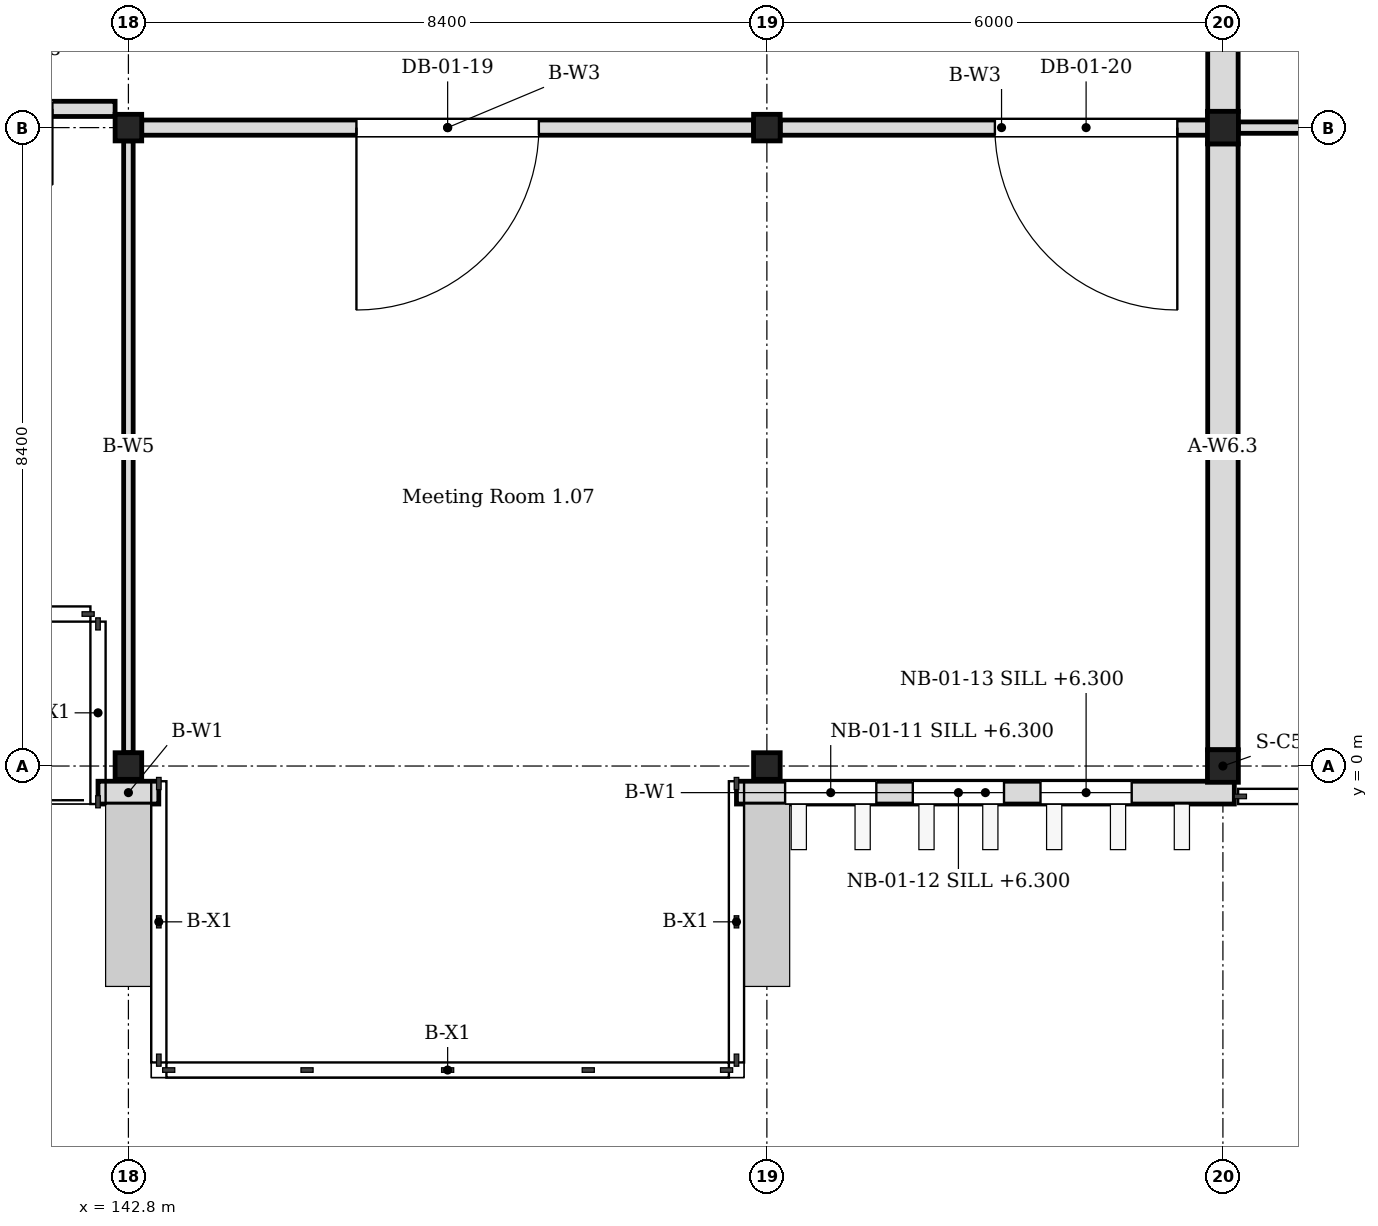
"""IFC4 building model, lengths in metres.
Left out: names, types, materials, properties, quantities, classifications, styles, units other than length and angle.
Written with IfcOpenShell. Run it as: python <this file> out.ifc"""

import sys

from ifc_helpers import new_model, si_unit, direction, frame, frame_2d, origin, origin_2d, place, context, subcontext, project, spatial, rectangle, i_section, extrude, element, fill, save


model = new_model("IFC4")
c1 = context("Model", 3, precision=1e-05, world=origin(), true_north=direction((0.0, 1.0)))
c2 = subcontext(c1, "Body", "Model", "MODEL_VIEW")
j1 = project(units=[si_unit("LENGTHUNIT", "METRE"), si_unit("PLANEANGLEUNIT", "RADIAN")], contexts=[c1])
p1 = place(None, origin())
s1 = spatial("IfcSite", under=j1, at=p1, CompositionType="ELEMENT")
p2 = place(p1, origin())
s2 = spatial("IfcBuilding", under=s1, at=p2, CompositionType="ELEMENT")
p3 = place(p2, frame((0.0, 0.0, 6.0)))
s3 = spatial("IfcBuildingStorey", under=s2, at=p3, CompositionType="ELEMENT", Elevation=6.0)
for number, where, z_axis, x_axis in (
    (1, (157.2, 0.0, 0.0), (0.0, 0.0, 1.0), (1.0, 0.0, 0.0)),
    (2, (157.2, 8.4, 0.0), (0.0, 0.0, 1.0), (1.0, 0.0, 0.0)),
):
    element("IfcColumn", number, at=place(p3, frame(where, z_axis=z_axis, x_axis=x_axis)), inside=s3, PredefinedType="COLUMN", context=c2, shape_type="SweptSolid", body=[
        extrude(i_section(OverallWidth=0.407, OverallDepth=0.428, WebThickness=0.02, FlangeThickness=0.035, FilletRadius=0.022, at=origin_2d()), origin(), (0.0, 0.0, 1.0), 4.2),
    ])
for number, where, z_axis, x_axis in (
    (3, (142.8, 0.0, 0.0), (0.0, 0.0, 1.0), (1.0, 0.0, 0.0)),
    (4, (142.8, 8.4, 0.0), (0.0, 0.0, 1.0), (1.0, 0.0, 0.0)),
    (5, (151.2, 0.0, 0.0), (0.0, 0.0, 1.0), (1.0, 0.0, 0.0)),
    (6, (151.2, 8.4, 0.0), (0.0, 0.0, 1.0), (1.0, 0.0, 0.0)),
):
    element("IfcColumn", number, at=place(p3, frame(where, z_axis=z_axis, x_axis=x_axis)), inside=s3, PredefinedType="COLUMN", context=c2, shape_type="SweptSolid", body=[
        extrude(i_section(OverallWidth=0.35, OverallDepth=0.35, WebThickness=0.012, FlangeThickness=0.019, FilletRadius=0.013, at=origin_2d()), origin(), (0.0, 0.0, 1.0), 4.2),
    ])
p4 = place(p3, frame((142.4, -0.35, 0.0), z_axis=(0.0, 0.0, 1.0), x_axis=(1.0, 0.0, 0.0)))
e7 = element("IfcWall", 7, at=p4, inside=s3, PredefinedType="SOLIDWALL", context=c2, shape_type="SweptSolid", body=[
    extrude(rectangle(XDim=0.8, YDim=0.3, at=frame_2d((0.4, 0.0))), origin(), (0.0, 0.0, 1.0), 4.05),
])
p5 = place(p3, frame((150.8, -0.35, 0.0), z_axis=(0.0, 0.0, 1.0), x_axis=(1.0, 0.0, 0.0)))
e8 = element("IfcWall", 8, at=p5, inside=s3, PredefinedType="SOLIDWALL", context=c2, shape_type="SweptSolid", body=[
    extrude(rectangle(XDim=6.55, YDim=0.3, at=frame_2d((3.275, 0.0))), origin(), (0.0, 0.0, 1.0), 4.05),
])
p6 = place(p5, frame((0.64, 0.0, 0.3)))
e9 = element("IfcOpeningElement", 9, at=p6, cuts=e8, PredefinedType="OPENING", context=c2, shape_type="SweptSolid", body=[
    extrude(rectangle(XDim=1.2, YDim=3.3, at=frame_2d((0.6, 1.65))), frame((0.0, 0.16, 0.0), z_axis=(0.0, -1.0, 0.0), x_axis=(1.0, 0.0, 0.0)), (0.0, 0.0, 1.0), 0.32),
])
p7 = place(p5, frame((2.32, 0.0, 0.3)))
e10 = element("IfcOpeningElement", 10, at=p7, cuts=e8, PredefinedType="OPENING", context=c2, shape_type="SweptSolid", body=[
    extrude(rectangle(XDim=1.2, YDim=3.3, at=frame_2d((0.6, 1.65))), frame((0.0, 0.16, 0.0), z_axis=(0.0, -1.0, 0.0), x_axis=(1.0, 0.0, 0.0)), (0.0, 0.0, 1.0), 0.32),
])
p8 = place(p5, frame((4.0, 0.0, 0.3)))
e11 = element("IfcOpeningElement", 11, at=p8, cuts=e8, PredefinedType="OPENING", context=c2, shape_type="SweptSolid", body=[
    extrude(rectangle(XDim=1.2, YDim=3.3, at=frame_2d((0.6, 1.65))), frame((0.0, 0.16, 0.0), z_axis=(0.0, -1.0, 0.0), x_axis=(1.0, 0.0, 0.0)), (0.0, 0.0, 1.0), 0.32),
])
p9 = place(p2, origin())
s4 = spatial("IfcBuildingStorey", under=s2, at=p9, CompositionType="ELEMENT", Elevation=0.0)
p10 = place(p9, frame((157.2, 0.214, 0.0), z_axis=(0.0, 0.0, 1.0), x_axis=(0.0, 1.0, 0.0)))
e12 = element("IfcWall", 12, at=p10, inside=s4, PredefinedType="SOLIDWALL", context=c2, shape_type="SweptSolid", body=[
    extrude(rectangle(XDim=7.972, YDim=0.4, at=frame_2d((3.986, 0.0))), origin(), (0.0, 0.0, 1.0), 9.45),
])
p11 = place(p9, frame((157.404, 8.4, 0.0), z_axis=(0.0, 0.0, 1.0), x_axis=(1.0, 0.0, 0.0)))
e13 = element("IfcWall", 13, at=p11, inside=s4, PredefinedType="PARTITIONING", context=c2, shape_type="SweptSolid", body=[
    extrude(rectangle(XDim=10.396, YDim=0.15, at=frame_2d((5.198, 0.0))), origin(), (0.0, 0.0, 1.0), 9.604),
])
p12 = place(p11, frame((2.997, 0.0, 0.0)))
e14 = element("IfcOpeningElement", 14, at=p12, cuts=e13, PredefinedType="OPENING", context=c2, shape_type="SweptSolid", body=[
    extrude(rectangle(XDim=1.2, YDim=2.1, at=frame_2d((0.6, 1.05))), frame((0.0, 0.085, 0.0), z_axis=(0.0, -1.0, 0.0), x_axis=(1.0, 0.0, 0.0)), (0.0, 0.0, 1.0), 0.17),
])
p13 = place(p3, frame((134.575, 8.646, 0.0), z_axis=(0.0, 0.0, 1.0), x_axis=(1.0, 0.0, 0.0)))
e15 = element("IfcWall", 15, at=p13, inside=s3, PredefinedType="PARTITIONING", context=c2, shape_type="SweptSolid", body=[
    extrude(rectangle(XDim=8.05, YDim=0.2, at=frame_2d((4.025, 0.0))), origin(), (0.0, 0.0, 1.0), 3.35),
])
p14 = place(p13, frame((6.225, 0.0, 0.0)))
e16 = element("IfcOpeningElement", 16, at=p14, cuts=e15, PredefinedType="OPENING", context=c2, shape_type="SweptSolid", body=[
    extrude(rectangle(XDim=1.0, YDim=2.1, at=frame_2d((0.5, 1.05))), frame((0.0, 0.11, 0.0), z_axis=(0.0, -1.0, 0.0), x_axis=(1.0, 0.0, 0.0)), (0.0, 0.0, 1.0), 0.22),
])
p15 = place(p3, frame((142.975, 8.4, 0.0), z_axis=(0.0, 0.0, 1.0), x_axis=(1.0, 0.0, 0.0)))
e17 = element("IfcWall", 17, at=p15, inside=s3, PredefinedType="PARTITIONING", context=c2, shape_type="SweptSolid", body=[
    extrude(rectangle(XDim=8.05, YDim=0.2, at=frame_2d((4.025, 0.0))), origin(), (0.0, 0.0, 1.0), 3.35),
])
p16 = place(p15, frame((2.825, 0.0, 0.0)))
e18 = element("IfcOpeningElement", 18, at=p16, cuts=e17, PredefinedType="OPENING", context=c2, shape_type="SweptSolid", body=[
    extrude(rectangle(XDim=2.4, YDim=2.2, at=frame_2d((1.2, 1.1))), frame((0.0, 0.11, 0.0), z_axis=(0.0, -1.0, 0.0), x_axis=(1.0, 0.0, 0.0)), (0.0, 0.0, 1.0), 0.22),
])
p17 = place(p3, frame((151.375, 8.4, 0.0), z_axis=(0.0, 0.0, 1.0), x_axis=(1.0, 0.0, 0.0)))
e19 = element("IfcWall", 19, at=p17, inside=s3, PredefinedType="PARTITIONING", context=c2, shape_type="SweptSolid", body=[
    extrude(rectangle(XDim=5.825, YDim=0.2, at=frame_2d((2.913, 0.0))), origin(), (0.0, 0.0, 1.0), 3.35),
])
p18 = place(p17, frame((2.825, 0.0, 0.0)))
e20 = element("IfcOpeningElement", 20, at=p18, cuts=e19, PredefinedType="OPENING", context=c2, shape_type="SweptSolid", body=[
    extrude(rectangle(XDim=2.4, YDim=2.2, at=frame_2d((1.2, 1.1))), frame((0.0, 0.11, 0.0), z_axis=(0.0, -1.0, 0.0), x_axis=(1.0, 0.0, 0.0)), (0.0, 0.0, 1.0), 0.22),
])
p19 = place(p3, frame((142.8, 0.175, 0.0), z_axis=(0.0, 0.0, 1.0), x_axis=(0.0, 1.0, 0.0)))
e21 = element("IfcWall", 21, at=p19, inside=s3, PredefinedType="MOVABLE", context=c2, shape_type="SweptSolid", body=[
    extrude(rectangle(XDim=8.05, YDim=0.125, at=frame_2d((4.025, 0.0))), origin(), (0.0, 0.0, 1.0), 3.35),
])
p20 = place(p6, origin())
e22 = element("IfcWindow", 22, at=p20, inside=s3, PartitioningType="TRIPLE_PANEL_VERTICAL", PredefinedType="WINDOW", context=c2, shape_type="SweptSolid", body=[
    extrude(rectangle(XDim=1.2, YDim=3.3, at=frame_2d((0.6, 1.65))), frame((0.0, 0.03, 0.0), z_axis=(0.0, -1.0, 0.0), x_axis=(1.0, 0.0, 0.0)), (0.0, 0.0, 1.0), 0.06),
])
fill(e9, e22)
p21 = place(p7, origin())
e23 = element("IfcWindow", 23, at=p21, inside=s3, PartitioningType="TRIPLE_PANEL_VERTICAL", PredefinedType="WINDOW", context=c2, shape_type="SweptSolid", body=[
    extrude(rectangle(XDim=1.2, YDim=3.3, at=frame_2d((0.6, 1.65))), frame((0.0, 0.03, 0.0), z_axis=(0.0, -1.0, 0.0), x_axis=(1.0, 0.0, 0.0)), (0.0, 0.0, 1.0), 0.06),
])
fill(e10, e23)
p22 = place(p8, origin())
e24 = element("IfcWindow", 24, at=p22, inside=s3, PartitioningType="TRIPLE_PANEL_VERTICAL", PredefinedType="WINDOW", context=c2, shape_type="SweptSolid", body=[
    extrude(rectangle(XDim=1.2, YDim=3.3, at=frame_2d((0.6, 1.65))), frame((0.0, 0.03, 0.0), z_axis=(0.0, -1.0, 0.0), x_axis=(1.0, 0.0, 0.0)), (0.0, 0.0, 1.0), 0.06),
])
fill(e11, e24)
p23 = place(p16, origin())
e25 = element("IfcDoor", 25, at=p23, inside=s3, OperationType="DOUBLE_DOOR_SINGLE_SWING", PredefinedType="DOOR", context=c2, shape_type="SweptSolid", body=[
    extrude(rectangle(XDim=2.4, YDim=2.2, at=frame_2d((1.2, 1.1))), frame((0.0, 0.025, 0.0), z_axis=(0.0, -1.0, 0.0), x_axis=(1.0, 0.0, 0.0)), (0.0, 0.0, 1.0), 0.05),
])
fill(e18, e25)
p24 = place(p18, origin())
e26 = element("IfcDoor", 26, at=p24, inside=s3, OperationType="DOUBLE_DOOR_SINGLE_SWING", PredefinedType="DOOR", context=c2, shape_type="SweptSolid", body=[
    extrude(rectangle(XDim=2.4, YDim=2.2, at=frame_2d((1.2, 1.1))), frame((0.0, 0.025, 0.0), z_axis=(0.0, -1.0, 0.0), x_axis=(1.0, 0.0, 0.0)), (0.0, 0.0, 1.0), 0.05),
])
fill(e20, e26)
save(model, sys.argv[1])
